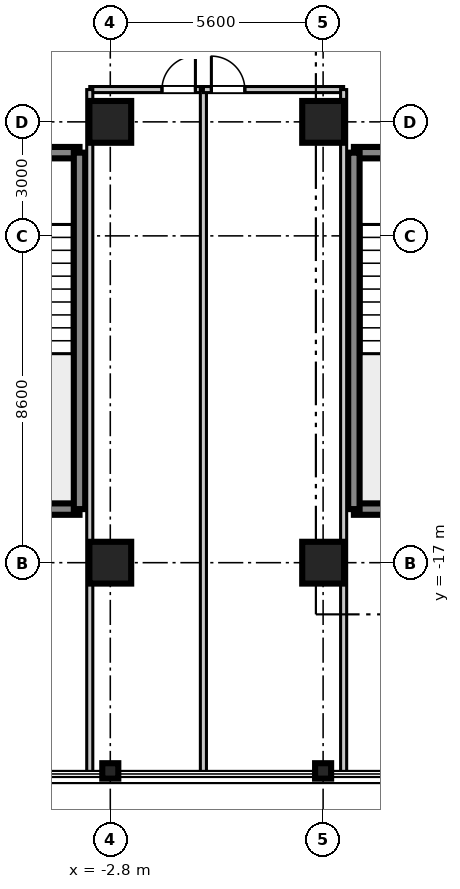
"""IFC4 building model, lengths in metres.
Left out: names, types, materials, properties, quantities, classifications, styles, units other than length and angle.
Written with IfcOpenShell. Run it as: python <this file> out.ifc"""

import sys

from ifc_helpers import new_model, si_unit, direction, frame, frame_2d, origin, origin_2d, place, context, subcontext, project, spatial, rectangle, i_section, extrude, source, transform, mapped, element, fill, save


model = new_model("IFC4")
c1 = context("Model", 3, precision=1e-05, world=origin(), true_north=direction((0.0, 1.0)))
c2 = subcontext(c1, "Body", "Model", "MODEL_VIEW")
j1 = project(units=[si_unit("LENGTHUNIT", "METRE"), si_unit("PLANEANGLEUNIT", "RADIAN")], contexts=[c1])
p1 = place(None, origin())
s1 = spatial("IfcSite", under=j1, at=p1, CompositionType="ELEMENT")
p2 = place(p1, origin())
s2 = spatial("IfcBuilding", under=s1, at=p2, CompositionType="ELEMENT")
p3 = place(p2, frame((0.0, 0.0, 156.3)))
s3 = spatial("IfcBuildingStorey", under=s2, at=p3, CompositionType="ELEMENT", Elevation=156.3)
m1 = source(origin(), c2, "Body", "SweptSolid", [
    extrude(rectangle(XDim=1.1, YDim=1.1, at=origin_2d()), origin(), (0.0, 0.0, 1.0), 3.605),
])
for number, where, z_axis, x_axis in (
    (1, (-2.8, -17.0, 0.0), (0.0, 0.0, 1.0), (1.0, 0.0, 0.0)),
    (2, (-2.8, -5.4, 0.0), (0.0, 0.0, 1.0), (1.0, 0.0, 0.0)),
    (3, (2.8, -17.0, 0.0), (0.0, 0.0, 1.0), (1.0, 0.0, 0.0)),
    (4, (2.8, -5.4, 0.0), (0.0, 0.0, 1.0), (1.0, 0.0, 0.0)),
):
    element("IfcColumn", number, at=place(p3, frame(where, z_axis=z_axis, x_axis=x_axis)), inside=s3, PredefinedType="COLUMN", context=c2, shape_type="MappedRepresentation", body=[
        mapped(m1, transform((0.0, 0.0, 0.0), scale=1.0)),
    ])
m2 = source(origin(), c2, "Body", "SweptSolid", [
    extrude(i_section(OverallWidth=0.406, OverallDepth=0.422, WebThickness=0.019, FlangeThickness=0.03, at=origin_2d()), origin(), (0.0, 0.0, 1.0), 3.605),
])
for number, where, z_axis, x_axis in (
    (5, (-2.8, -22.48, 0.0), (0.0, 0.0, 1.0), (0.0, 1.0, 0.0)),
    (6, (2.8, -22.48, 0.0), (0.0, 0.0, 1.0), (0.0, 1.0, 0.0)),
):
    element("IfcColumn", number, at=place(p3, frame(where, z_axis=z_axis, x_axis=x_axis)), inside=s3, PredefinedType="COLUMN", context=c2, shape_type="MappedRepresentation", body=[
        mapped(m2, transform((0.0, 0.0, 0.0), scale=1.0)),
    ])
m3 = source(origin(), c2, "Body", "SweptSolid", [
    extrude(rectangle(XDim=3.98, YDim=0.3, at=frame_2d((1.99, 0.0))), origin(), (0.0, 0.0, 1.0), 3.39),
])
for number, where, z_axis, x_axis in (
    (7, (3.61, -15.59, 0.0), (0.0, 0.0, 1.0), (1.0, 0.0, 0.0)),
    (8, (3.61, -6.21, 0.0), (0.0, 0.0, 1.0), (1.0, 0.0, 0.0)),
):
    element("IfcWall", number, at=place(p3, frame(where, z_axis=z_axis, x_axis=x_axis)), inside=s3, PredefinedType="SHEAR", context=c2, shape_type="MappedRepresentation", body=[
        mapped(m3, transform((0.0, 0.0, 0.0), scale=1.0)),
    ])
m4 = source(origin(), c2, "Body", "SweptSolid", [
    extrude(rectangle(XDim=9.38, YDim=0.3, at=frame_2d((4.69, 0.0))), origin(), (0.0, 0.0, 1.0), 3.39),
])
p4 = place(p3, frame((3.61, -15.59, 0.0), z_axis=(0.0, 0.0, 1.0), x_axis=(0.0, 1.0, 0.0)))
e9 = element("IfcWall", 9, at=p4, inside=s3, PredefinedType="SHEAR", context=c2, shape_type="MappedRepresentation", body=[
    mapped(m4, transform((0.0, 0.0, 0.0), scale=1.0)),
])
p5 = place(p3, frame((-7.59, -15.59, 0.0), z_axis=(0.0, 0.0, 1.0), x_axis=(1.0, 0.0, 0.0)))
e10 = element("IfcWall", 10, at=p5, inside=s3, PredefinedType="SHEAR", context=c2, shape_type="MappedRepresentation", body=[
    mapped(m3, transform((0.0, 0.0, 0.0), scale=1.0)),
])
p6 = place(p3, frame((-7.59, -6.21, 0.0), z_axis=(0.0, 0.0, 1.0), x_axis=(1.0, 0.0, 0.0)))
e11 = element("IfcWall", 11, at=p6, inside=s3, PredefinedType="SHEAR", context=c2, shape_type="MappedRepresentation", body=[
    mapped(m3, transform((0.0, 0.0, 0.0), scale=1.0)),
])
p7 = place(p6, frame((1.44, 0.0, 0.0)))
e12 = element("IfcOpeningElement", 12, at=p7, cuts=e11, PredefinedType="OPENING", context=c2, shape_type="SweptSolid", body=[
    extrude(rectangle(XDim=1.1, YDim=2.15, at=frame_2d((0.55, 1.075))), frame((0.0, 0.16, 0.0), z_axis=(0.0, -1.0, 0.0), x_axis=(1.0, 0.0, 0.0)), (0.0, 0.0, 1.0), 0.32),
])
p8 = place(p3, frame((-3.61, -15.59, 0.0), z_axis=(0.0, 0.0, 1.0), x_axis=(0.0, 1.0, 0.0)))
e13 = element("IfcWall", 13, at=p8, inside=s3, PredefinedType="SHEAR", context=c2, shape_type="MappedRepresentation", body=[
    mapped(m4, transform((0.0, 0.0, 0.0), scale=1.0)),
])
m5 = source(origin(), c2, "Body", "SweptSolid", [
    extrude(rectangle(XDim=2.99, YDim=0.16, at=frame_2d((1.495, 0.0))), origin(), (0.0, 0.0, 1.0), 2.73),
])
p9 = place(p3, frame((-3.34, -4.55, 0.0), z_axis=(0.0, 0.0, 1.0), x_axis=(1.0, 0.0, 0.0)))
e14 = element("IfcWall", 14, at=p9, inside=s3, PredefinedType="PARTITIONING", context=c2, shape_type="MappedRepresentation", body=[
    mapped(m5, transform((0.0, 0.0, 0.0), scale=1.0)),
])
p10 = place(p9, frame((1.9, 0.0, 0.0)))
e15 = element("IfcOpeningElement", 15, at=p10, cuts=e14, PredefinedType="OPENING", context=c2, shape_type="SweptSolid", body=[
    extrude(rectangle(XDim=0.88, YDim=2.1, at=frame_2d((0.44, 1.05))), frame((0.0, 0.09, 0.0), z_axis=(0.0, -1.0, 0.0), x_axis=(1.0, 0.0, 0.0)), (0.0, 0.0, 1.0), 0.18),
])
m6 = source(origin(), c2, "Body", "SweptSolid", [
    extrude(rectangle(XDim=17.95, YDim=0.16, at=frame_2d((8.975, 0.0))), origin(), (0.0, 0.0, 1.0), 2.73),
])
for number, where, z_axis, x_axis in (
    (16, (-3.34, -22.5, 0.0), (0.0, 0.0, 1.0), (0.0, 1.0, 0.0)),
    (17, (-0.35, -22.5, 0.0), (0.0, 0.0, 1.0), (0.0, 1.0, 0.0)),
):
    element("IfcWall", number, at=place(p3, frame(where, z_axis=z_axis, x_axis=x_axis)), inside=s3, PredefinedType="PARTITIONING", context=c2, shape_type="MappedRepresentation", body=[
        mapped(m6, transform((0.0, 0.0, 0.0), scale=1.0)),
    ])
m7 = source(origin(), c2, "Body", "SweptSolid", [
    extrude(rectangle(XDim=3.69, YDim=0.16, at=frame_2d((1.845, 0.0))), origin(), (0.0, 0.0, 1.0), 2.73),
])
p11 = place(p3, frame((-0.35, -4.55, 0.0), z_axis=(0.0, 0.0, 1.0), x_axis=(1.0, 0.0, 0.0)))
e18 = element("IfcWall", 18, at=p11, inside=s3, PredefinedType="PARTITIONING", context=c2, shape_type="MappedRepresentation", body=[
    mapped(m7, transform((0.0, 0.0, 0.0), scale=1.0)),
])
p12 = place(p11, frame((0.21, 0.0, 0.0)))
e19 = element("IfcOpeningElement", 19, at=p12, cuts=e18, PredefinedType="OPENING", context=c2, shape_type="SweptSolid", body=[
    extrude(rectangle(XDim=0.88, YDim=2.1, at=frame_2d((0.44, 1.05))), frame((0.0, 0.09, 0.0), z_axis=(0.0, -1.0, 0.0), x_axis=(1.0, 0.0, 0.0)), (0.0, 0.0, 1.0), 0.18),
])
p13 = place(p3, frame((3.34, -22.5, 0.0), z_axis=(0.0, 0.0, 1.0), x_axis=(0.0, 1.0, 0.0)))
e20 = element("IfcWall", 20, at=p13, inside=s3, PredefinedType="PARTITIONING", context=c2, shape_type="MappedRepresentation", body=[
    mapped(m6, transform((0.0, 0.0, 0.0), scale=1.0)),
])
m8 = source(origin(), c2, "Body", "SweptSolid", [
    extrude(rectangle(XDim=0.88, YDim=2.1, at=frame_2d((0.44, 1.05))), frame((0.0, 0.025, 0.0), z_axis=(0.0, -1.0, 0.0), x_axis=(1.0, 0.0, 0.0)), (0.0, 0.0, 1.0), 0.05),
])
p14 = place(p10, frame((0.88, 0.0, 0.0), z_axis=(0.0, 0.0, 1.0), x_axis=(-1.0, 0.0, 0.0)))
e21 = element("IfcDoor", 21, at=p14, inside=s3, OperationType="SINGLE_SWING_RIGHT", PredefinedType="DOOR", context=c2, shape_type="MappedRepresentation", body=[
    mapped(m8, transform((0.0, 0.0, 0.0), scale=1.0)),
])
fill(e15, e21)
p15 = place(p12, frame((0.88, 0.0, 0.0), z_axis=(0.0, 0.0, 1.0), x_axis=(-1.0, 0.0, 0.0)))
e22 = element("IfcDoor", 22, at=p15, inside=s3, OperationType="SINGLE_SWING_LEFT", PredefinedType="DOOR", context=c2, shape_type="MappedRepresentation", body=[
    mapped(m8, transform((0.0, 0.0, 0.0), scale=1.0)),
])
fill(e19, e22)
save(model, sys.argv[1])
